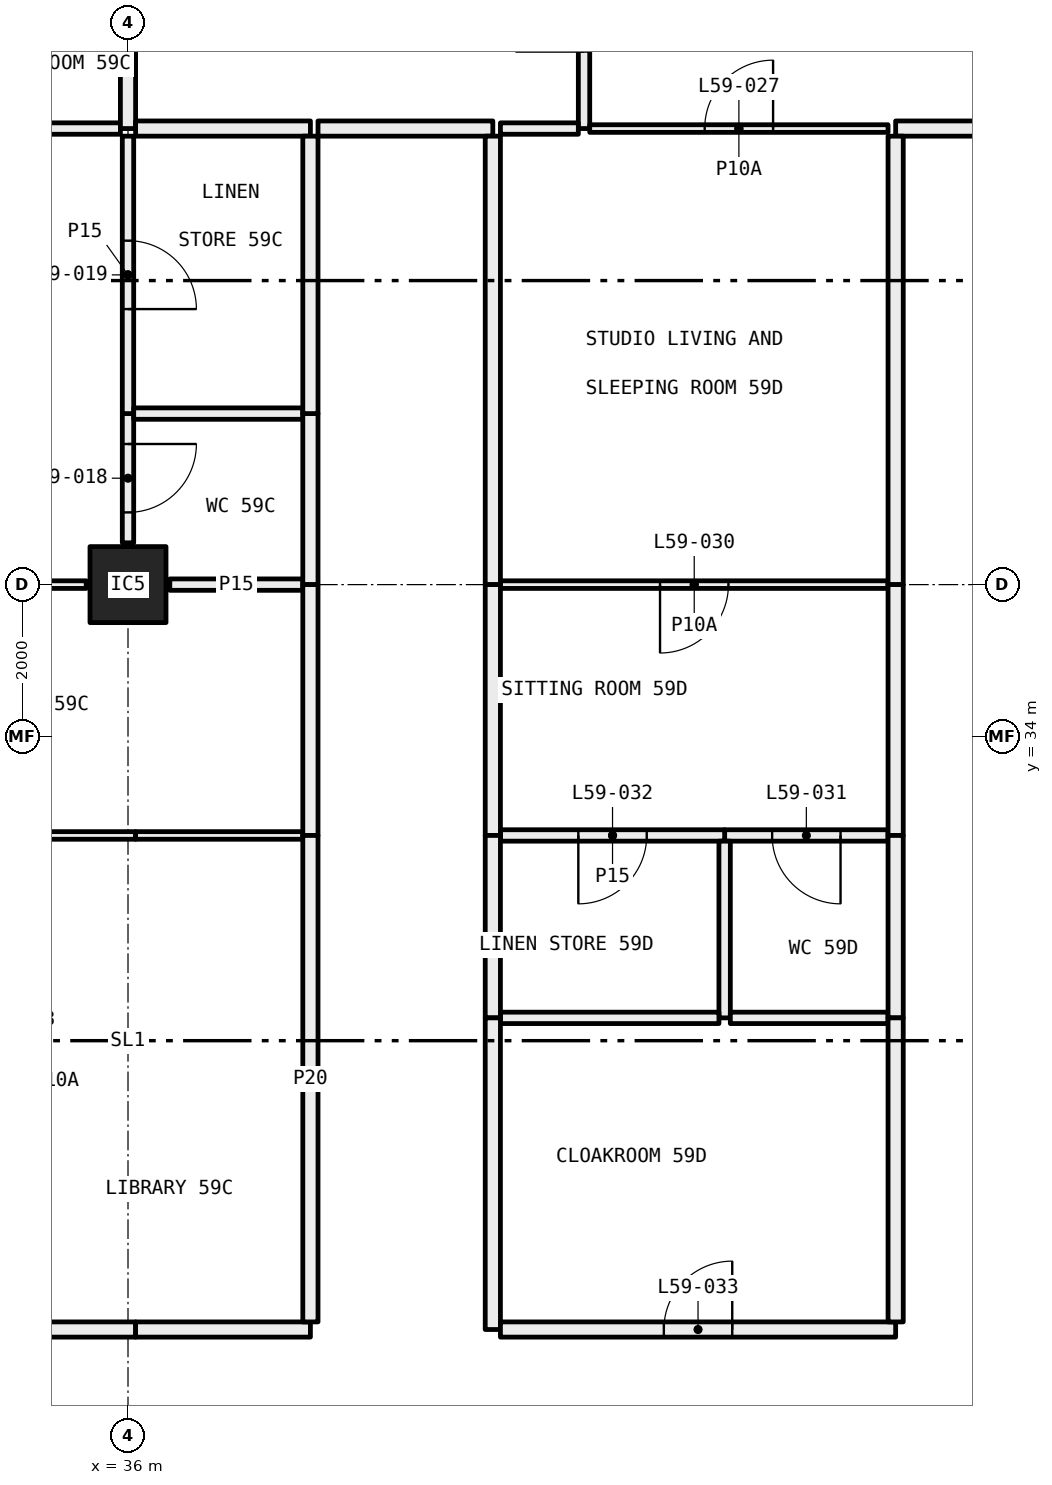
"""IFC4 building model, lengths in metres.
Left out: names, types, materials, properties, quantities, classifications, styles, units other than length and angle.
Written with IfcOpenShell. Run it as: python <this file> out.ifc"""

import sys

from ifc_helpers import new_model, si_unit, direction, frame, frame_2d, origin, origin_2d, place, context, subcontext, project, spatial, rectangle, hollow_rectangle, extrude, element, fill, save


model = new_model("IFC4")
c1 = context("Model", 3, precision=1e-05, world=origin(), true_north=direction((0.0, 1.0)))
c2 = subcontext(c1, "Body", "Model", "MODEL_VIEW")
j1 = project(units=[si_unit("LENGTHUNIT", "METRE"), si_unit("PLANEANGLEUNIT", "RADIAN")], contexts=[c1])
p1 = place(None, origin())
s1 = spatial("IfcSite", under=j1, at=p1, CompositionType="ELEMENT")
p2 = place(p1, origin())
s2 = spatial("IfcBuilding", under=s1, at=p2, CompositionType="ELEMENT")
p3 = place(p2, frame((0.0, 0.0, 221.4)))
s3 = spatial("IfcBuildingStorey", under=s2, at=p3, CompositionType="ELEMENT", Elevation=221.4)
p4 = place(p3, frame((36.0, 36.0, 0.0), z_axis=(0.0, 0.0, 1.0), x_axis=(1.0, 0.0, 0.0)))
e1 = element("IfcColumn", 1, at=p4, inside=s3, PredefinedType="COLUMN", context=c2, shape_type="SweptSolid", body=[
    extrude(hollow_rectangle(XDim=1.0, YDim=1.0, WallThickness=0.04, at=origin_2d()), origin(), (0.0, 0.0, 1.0), 3.05),
])
p5 = place(p3, frame((30.075, 42.0, 0.0), z_axis=(0.0, 0.0, 1.0), x_axis=(1.0, 0.0, 0.0)))
e2 = element("IfcWall", 2, at=p5, inside=s3, PredefinedType="PARTITIONING", context=c2, shape_type="SweptSolid", body=[
    extrude(rectangle(XDim=5.825, YDim=0.15, at=frame_2d((2.913, 0.0))), origin(), (0.0, 0.0, 1.0), 3.05),
])
p6 = place(p5, frame((2.462, 0.0, 0.0)))
e3 = element("IfcOpeningElement", 3, at=p6, cuts=e2, PredefinedType="OPENING", context=c2, shape_type="SweptSolid", body=[
    extrude(rectangle(XDim=0.9, YDim=2.1, at=frame_2d((0.45, 1.05))), frame((0.0, 0.085, 0.0), z_axis=(0.0, -1.0, 0.0), x_axis=(1.0, 0.0, 0.0)), (0.0, 0.0, 1.0), 0.17),
])
p7 = place(p3, frame((36.0, 42.0, 0.0), z_axis=(0.0, 0.0, 1.0), x_axis=(0.0, 1.0, 0.0)))
e4 = element("IfcWall", 4, at=p7, inside=s3, PredefinedType="PARTITIONING", context=c2, shape_type="SweptSolid", body=[
    extrude(rectangle(XDim=1.68, YDim=0.2, at=frame_2d((0.84, 0.0))), origin(), (0.0, 0.0, 1.0), 2.45),
])
p8 = place(p3, frame((36.0, 36.55, 0.0), z_axis=(0.0, 0.0, 1.0), x_axis=(0.0, 1.0, 0.0)))
e5 = element("IfcWall", 5, at=p8, inside=s3, PredefinedType="PARTITIONING", context=c2, shape_type="SweptSolid", body=[
    extrude(rectangle(XDim=1.7, YDim=0.15, at=frame_2d((0.85, 0.0))), origin(), (0.0, 0.0, 1.0), 2.45),
])
p9 = place(p8, frame((0.4, 0.0, 0.0)))
e6 = element("IfcOpeningElement", 6, at=p9, cuts=e5, PredefinedType="OPENING", context=c2, shape_type="SweptSolid", body=[
    extrude(rectangle(XDim=0.9, YDim=2.1, at=frame_2d((0.45, 1.05))), frame((0.0, 0.085, 0.0), z_axis=(0.0, -1.0, 0.0), x_axis=(1.0, 0.0, 0.0)), (0.0, 0.0, 1.0), 0.17),
])
p10 = place(p3, frame((36.0, 38.25, 0.0), z_axis=(0.0, 0.0, 1.0), x_axis=(0.0, 1.0, 0.0)))
e7 = element("IfcWall", 7, at=p10, inside=s3, PredefinedType="PARTITIONING", context=c2, shape_type="SweptSolid", body=[
    extrude(rectangle(XDim=3.65, YDim=0.15, at=frame_2d((1.825, 0.0))), origin(), (0.0, 0.0, 1.0), 2.45),
])
p11 = place(p10, frame((1.375, 0.0, 0.0)))
e8 = element("IfcOpeningElement", 8, at=p11, cuts=e7, PredefinedType="OPENING", context=c2, shape_type="SweptSolid", body=[
    extrude(rectangle(XDim=0.9, YDim=2.1, at=frame_2d((0.45, 1.05))), frame((0.0, 0.085, 0.0), z_axis=(0.0, -1.0, 0.0), x_axis=(1.0, 0.0, 0.0)), (0.0, 0.0, 1.0), 0.17),
])
p12 = place(p3, frame((30.075, 36.0, 0.0), z_axis=(0.0, 0.0, 1.0), x_axis=(1.0, 0.0, 0.0)))
e9 = element("IfcWall", 9, at=p12, inside=s3, PredefinedType="PARTITIONING", context=c2, shape_type="SweptSolid", body=[
    extrude(rectangle(XDim=5.375, YDim=0.1, at=frame_2d((2.688, 0.0))), origin(), (0.0, 0.0, 1.0), 2.45),
])
p13 = place(p12, frame((2.238, 0.0, 0.0)))
e10 = element("IfcOpeningElement", 10, at=p13, cuts=e9, PredefinedType="OPENING", context=c2, shape_type="SweptSolid", body=[
    extrude(rectangle(XDim=0.9, YDim=2.1, at=frame_2d((0.45, 1.05))), frame((0.0, 0.06, 0.0), z_axis=(0.0, -1.0, 0.0), x_axis=(1.0, 0.0, 0.0)), (0.0, 0.0, 1.0), 0.12),
])
p14 = place(p3, frame((38.3, 38.25, 0.0), z_axis=(0.0, 0.0, 1.0), x_axis=(-1.0, 0.0, 0.0)))
e11 = element("IfcWall", 11, at=p14, inside=s3, PredefinedType="PARTITIONING", context=c2, shape_type="SweptSolid", body=[
    extrude(rectangle(XDim=2.225, YDim=0.15, at=frame_2d((1.113, 0.0))), origin(), (0.0, 0.0, 1.0), 2.45),
])
p15 = place(p3, frame((36.55, 36.0, 0.0), z_axis=(0.0, 0.0, 1.0), x_axis=(1.0, 0.0, 0.0)))
e12 = element("IfcWall", 12, at=p15, inside=s3, PredefinedType="PARTITIONING", context=c2, shape_type="SweptSolid", body=[
    extrude(rectangle(XDim=1.75, YDim=0.15, at=frame_2d((0.875, 0.0))), origin(), (0.0, 0.0, 1.0), 2.45),
])
p16 = place(p3, frame((38.4, 36.0, 0.0), z_axis=(0.0, 0.0, 1.0), x_axis=(0.0, 1.0, 0.0)))
e13 = element("IfcWall", 13, at=p16, inside=s3, PredefinedType="PARTITIONING", context=c2, shape_type="SweptSolid", body=[
    extrude(rectangle(XDim=2.25, YDim=0.2, at=frame_2d((1.125, 0.0))), origin(), (0.0, 0.0, 1.0), 2.45),
])
p17 = place(p3, frame((38.4, 42.0, 0.0), z_axis=(0.0, 0.0, 1.0), x_axis=(-1.0, 0.0, 0.0)))
e14 = element("IfcWall", 14, at=p17, inside=s3, PredefinedType="PARTITIONING", context=c2, shape_type="SweptSolid", body=[
    extrude(rectangle(XDim=2.3, YDim=0.2, at=frame_2d((1.15, 0.0))), origin(), (0.0, 0.0, 1.0), 3.05),
])
p18 = place(p3, frame((38.4, 38.25, 0.0), z_axis=(0.0, 0.0, 1.0), x_axis=(0.0, 1.0, 0.0)))
e15 = element("IfcWall", 15, at=p18, inside=s3, PredefinedType="PARTITIONING", context=c2, shape_type="SweptSolid", body=[
    extrude(rectangle(XDim=3.65, YDim=0.2, at=frame_2d((1.825, 0.0))), origin(), (0.0, 0.0, 1.0), 3.05),
])
p19 = place(p3, frame((34.5, 32.7, 0.0), z_axis=(0.0, 0.0, 1.0), x_axis=(1.0, 0.0, 0.0)))
e16 = element("IfcWall", 16, at=p19, inside=s3, PredefinedType="PARTITIONING", context=c2, shape_type="SweptSolid", body=[
    extrude(rectangle(XDim=1.6, YDim=0.1, at=frame_2d((0.8, 0.0))), origin(), (0.0, 0.0, 1.0), 2.45),
])
p20 = place(p3, frame((36.1, 32.7, 0.0), z_axis=(0.0, 0.0, 1.0), x_axis=(1.0, 0.0, 0.0)))
e17 = element("IfcWall", 17, at=p20, inside=s3, PredefinedType="PARTITIONING", context=c2, shape_type="SweptSolid", body=[
    extrude(rectangle(XDim=2.2, YDim=0.1, at=frame_2d((1.1, 0.0))), origin(), (0.0, 0.0, 1.0), 3.05),
])
p21 = place(p3, frame((38.4, 32.7, 0.0), z_axis=(0.0, 0.0, 1.0), x_axis=(0.0, 1.0, 0.0)))
e18 = element("IfcWall", 18, at=p21, inside=s3, PredefinedType="PARTITIONING", context=c2, shape_type="SweptSolid", body=[
    extrude(rectangle(XDim=3.3, YDim=0.2, at=frame_2d((1.65, 0.0))), origin(), (0.0, 0.0, 1.0), 2.45),
])
p22 = place(p3, frame((34.5, 26.2, 0.0), z_axis=(0.0, 0.0, 1.0), x_axis=(1.0, 0.0, 0.0)))
e19 = element("IfcWall", 19, at=p22, inside=s3, PredefinedType="PARTITIONING", context=c2, shape_type="SweptSolid", body=[
    extrude(rectangle(XDim=1.6, YDim=0.2, at=frame_2d((0.8, 0.0))), origin(), (0.0, 0.0, 1.0), 2.45),
])
p23 = place(p3, frame((36.1, 26.2, 0.0), z_axis=(0.0, 0.0, 1.0), x_axis=(1.0, 0.0, 0.0)))
e20 = element("IfcWall", 20, at=p23, inside=s3, PredefinedType="PARTITIONING", context=c2, shape_type="SweptSolid", body=[
    extrude(rectangle(XDim=2.3, YDim=0.2, at=frame_2d((1.15, 0.0))), origin(), (0.0, 0.0, 1.0), 3.05),
])
p24 = place(p3, frame((38.4, 26.3, 0.0), z_axis=(0.0, 0.0, 1.0), x_axis=(0.0, 1.0, 0.0)))
e21 = element("IfcWall", 21, at=p24, inside=s3, PredefinedType="PARTITIONING", context=c2, shape_type="SweptSolid", body=[
    extrude(rectangle(XDim=6.4, YDim=0.2, at=frame_2d((3.2, 0.0))), origin(), (0.0, 0.0, 1.0), 3.05),
])
p25 = place(p3, frame((42.0, 42.0, 0.0), z_axis=(0.0, 0.0, 1.0), x_axis=(0.0, 1.0, 0.0)))
e22 = element("IfcWall", 22, at=p25, inside=s3, PredefinedType="PARTITIONING", context=c2, shape_type="SweptSolid", body=[
    extrude(rectangle(XDim=2.925, YDim=0.15, at=frame_2d((1.462, 0.0))), origin(), (0.0, 0.0, 1.0), 3.05),
])
p26 = place(p25, frame((1.012, 0.0, 0.0)))
e23 = element("IfcOpeningElement", 23, at=p26, cuts=e22, PredefinedType="OPENING", context=c2, shape_type="SweptSolid", body=[
    extrude(rectangle(XDim=0.9, YDim=2.1, at=frame_2d((0.45, 1.05))), frame((0.0, 0.085, 0.0), z_axis=(0.0, -1.0, 0.0), x_axis=(1.0, 0.0, 0.0)), (0.0, 0.0, 1.0), 0.17),
])
p27 = place(p3, frame((40.9, 42.0, 0.0), z_axis=(0.0, 0.0, 1.0), x_axis=(1.0, 0.0, 0.0)))
e24 = element("IfcWall", 24, at=p27, inside=s3, PredefinedType="PARTITIONING", context=c2, shape_type="SweptSolid", body=[
    extrude(rectangle(XDim=1.025, YDim=0.15, at=frame_2d((0.513, 0.0))), origin(), (0.0, 0.0, 1.0), 3.05),
])
p28 = place(p3, frame((38.5, 42.0, 0.0), z_axis=(0.0, 0.0, 1.0), x_axis=(1.0, 0.0, 0.0)))
e25 = element("IfcWall", 25, at=p28, inside=s3, PredefinedType="PARTITIONING", context=c2, shape_type="SweptSolid", body=[
    extrude(rectangle(XDim=2.3, YDim=0.2, at=frame_2d((1.15, 0.0))), origin(), (0.0, 0.0, 1.0), 3.05),
])
p29 = place(p3, frame((42.075, 42.0, 0.0), z_axis=(0.0, 0.0, 1.0), x_axis=(1.0, 0.0, 0.0)))
e26 = element("IfcWall", 26, at=p29, inside=s3, PredefinedType="PARTITIONING", context=c2, shape_type="SweptSolid", body=[
    extrude(rectangle(XDim=3.925, YDim=0.1, at=frame_2d((1.962, 0.0))), origin(), (0.0, 0.0, 1.0), 3.05),
])
p30 = place(p29, frame((1.512, 0.0, 0.0)))
e27 = element("IfcOpeningElement", 27, at=p30, cuts=e26, PredefinedType="OPENING", context=c2, shape_type="SweptSolid", body=[
    extrude(rectangle(XDim=0.9, YDim=2.1, at=frame_2d((0.45, 1.05))), frame((0.0, 0.06, 0.0), z_axis=(0.0, -1.0, 0.0), x_axis=(1.0, 0.0, 0.0)), (0.0, 0.0, 1.0), 0.12),
])
p31 = place(p3, frame((46.1, 42.0, 0.0), z_axis=(0.0, 0.0, 1.0), x_axis=(1.0, 0.0, 0.0)))
e28 = element("IfcWall", 28, at=p31, inside=s3, PredefinedType="PARTITIONING", context=c2, shape_type="SweptSolid", body=[
    extrude(rectangle(XDim=1.9, YDim=0.2, at=frame_2d((0.95, 0.0))), origin(), (0.0, 0.0, 1.0), 3.05),
])
p32 = place(p3, frame((40.9, 36.0, 0.0), z_axis=(0.0, 0.0, 1.0), x_axis=(1.0, 0.0, 0.0)))
e29 = element("IfcWall", 29, at=p32, inside=s3, PredefinedType="PARTITIONING", context=c2, shape_type="SweptSolid", body=[
    extrude(rectangle(XDim=5.1, YDim=0.1, at=frame_2d((2.55, 0.0))), origin(), (0.0, 0.0, 1.0), 2.45),
])
p33 = place(p32, frame((2.1, 0.0, 0.0)))
e30 = element("IfcOpeningElement", 30, at=p33, cuts=e29, PredefinedType="OPENING", context=c2, shape_type="SweptSolid", body=[
    extrude(rectangle(XDim=0.9, YDim=2.1, at=frame_2d((0.45, 1.05))), frame((0.0, 0.06, 0.0), z_axis=(0.0, -1.0, 0.0), x_axis=(1.0, 0.0, 0.0)), (0.0, 0.0, 1.0), 0.12),
])
for number, where, z_axis, x_axis in (
    (31, (40.8, 41.9, 0.0), (0.0, 0.0, 1.0), (0.0, -1.0, 0.0)),
    (32, (46.1, 36.0, 0.0), (0.0, 0.0, 1.0), (0.0, 1.0, 0.0)),
):
    element("IfcWall", number, at=place(p3, frame(where, z_axis=z_axis, x_axis=x_axis)), inside=s3, PredefinedType="PARTITIONING", context=c2, shape_type="SweptSolid", body=[
        extrude(rectangle(XDim=5.9, YDim=0.2, at=frame_2d((2.95, 0.0))), origin(), (0.0, 0.0, 1.0), 2.45),
    ])
p34 = place(p3, frame((43.85, 32.7, 0.0), z_axis=(0.0, 0.0, 1.0), x_axis=(1.0, 0.0, 0.0)))
e33 = element("IfcWall", 33, at=p34, inside=s3, PredefinedType="PARTITIONING", context=c2, shape_type="SweptSolid", body=[
    extrude(rectangle(XDim=2.15, YDim=0.15, at=frame_2d((1.075, 0.0))), origin(), (0.0, 0.0, 1.0), 3.05),
])
p35 = place(p34, frame((0.625, 0.0, 0.0)))
e34 = element("IfcOpeningElement", 34, at=p35, cuts=e33, PredefinedType="OPENING", context=c2, shape_type="SweptSolid", body=[
    extrude(rectangle(XDim=0.9, YDim=2.1, at=frame_2d((0.45, 1.05))), frame((0.0, 0.085, 0.0), z_axis=(0.0, -1.0, 0.0), x_axis=(1.0, 0.0, 0.0)), (0.0, 0.0, 1.0), 0.17),
])
p36 = place(p3, frame((40.9, 32.7, 0.0), z_axis=(0.0, 0.0, 1.0), x_axis=(1.0, 0.0, 0.0)))
e35 = element("IfcWall", 35, at=p36, inside=s3, PredefinedType="PARTITIONING", context=c2, shape_type="SweptSolid", body=[
    extrude(rectangle(XDim=2.95, YDim=0.15, at=frame_2d((1.475, 0.0))), origin(), (0.0, 0.0, 1.0), 3.05),
])
p37 = place(p36, frame((1.025, 0.0, 0.0)))
e36 = element("IfcOpeningElement", 36, at=p37, cuts=e35, PredefinedType="OPENING", context=c2, shape_type="SweptSolid", body=[
    extrude(rectangle(XDim=0.9, YDim=2.1, at=frame_2d((0.45, 1.05))), frame((0.0, 0.085, 0.0), z_axis=(0.0, -1.0, 0.0), x_axis=(1.0, 0.0, 0.0)), (0.0, 0.0, 1.0), 0.17),
])
for number, where, z_axis, x_axis in (
    (37, (40.8, 36.0, 0.0), (0.0, 0.0, 1.0), (0.0, -1.0, 0.0)),
    (38, (46.1, 32.7, 0.0), (0.0, 0.0, 1.0), (0.0, 1.0, 0.0)),
):
    element("IfcWall", number, at=place(p3, frame(where, z_axis=z_axis, x_axis=x_axis)), inside=s3, PredefinedType="PARTITIONING", context=c2, shape_type="SweptSolid", body=[
        extrude(rectangle(XDim=3.3, YDim=0.2, at=frame_2d((1.65, 0.0))), origin(), (0.0, 0.0, 1.0), 2.45),
    ])
p38 = place(p3, frame((43.85, 32.625, 0.0), z_axis=(0.0, 0.0, 1.0), x_axis=(0.0, -1.0, 0.0)))
e39 = element("IfcWall", 39, at=p38, inside=s3, PredefinedType="PARTITIONING", context=c2, shape_type="SweptSolid", body=[
    extrude(rectangle(XDim=2.325, YDim=0.15, at=frame_2d((1.163, 0.0))), origin(), (0.0, 0.0, 1.0), 3.05),
])
p39 = place(p3, frame((43.925, 30.3, 0.0), z_axis=(0.0, 0.0, 1.0), x_axis=(1.0, 0.0, 0.0)))
e40 = element("IfcWall", 40, at=p39, inside=s3, PredefinedType="PARTITIONING", context=c2, shape_type="SweptSolid", body=[
    extrude(rectangle(XDim=2.075, YDim=0.15, at=frame_2d((1.038, 0.0))), origin(), (0.0, 0.0, 1.0), 3.05),
])
p40 = place(p3, frame((46.1, 30.3, 0.0), z_axis=(0.0, 0.0, 1.0), x_axis=(0.0, 1.0, 0.0)))
e41 = element("IfcWall", 41, at=p40, inside=s3, PredefinedType="PARTITIONING", context=c2, shape_type="SweptSolid", body=[
    extrude(rectangle(XDim=2.4, YDim=0.2, at=frame_2d((1.2, 0.0))), origin(), (0.0, 0.0, 1.0), 3.05),
])
p41 = place(p3, frame((40.9, 30.3, 0.0), z_axis=(0.0, 0.0, 1.0), x_axis=(1.0, 0.0, 0.0)))
e42 = element("IfcWall", 42, at=p41, inside=s3, PredefinedType="PARTITIONING", context=c2, shape_type="SweptSolid", body=[
    extrude(rectangle(XDim=2.875, YDim=0.15, at=frame_2d((1.438, 0.0))), origin(), (0.0, 0.0, 1.0), 3.05),
])
p42 = place(p3, frame((40.8, 32.7, 0.0), z_axis=(0.0, 0.0, 1.0), x_axis=(0.0, -1.0, 0.0)))
e43 = element("IfcWall", 43, at=p42, inside=s3, PredefinedType="PARTITIONING", context=c2, shape_type="SweptSolid", body=[
    extrude(rectangle(XDim=2.4, YDim=0.2, at=frame_2d((1.2, 0.0))), origin(), (0.0, 0.0, 1.0), 3.05),
])
p43 = place(p3, frame((40.8, 30.3, 0.0), z_axis=(0.0, 0.0, 1.0), x_axis=(0.0, -1.0, 0.0)))
e44 = element("IfcWall", 44, at=p43, inside=s3, PredefinedType="PARTITIONING", context=c2, shape_type="SweptSolid", body=[
    extrude(rectangle(XDim=4.1, YDim=0.2, at=frame_2d((2.05, 0.0))), origin(), (0.0, 0.0, 1.0), 3.05),
])
p44 = place(p3, frame((40.9, 26.2, 0.0), z_axis=(0.0, 0.0, 1.0), x_axis=(1.0, 0.0, 0.0)))
e45 = element("IfcWall", 45, at=p44, inside=s3, PredefinedType="PARTITIONING", context=c2, shape_type="SweptSolid", body=[
    extrude(rectangle(XDim=5.2, YDim=0.2, at=frame_2d((2.6, 0.0))), origin(), (0.0, 0.0, 1.0), 3.05),
])
p45 = place(p44, frame((2.15, 0.0, 0.0)))
e46 = element("IfcOpeningElement", 46, at=p45, cuts=e45, PredefinedType="OPENING", context=c2, shape_type="SweptSolid", body=[
    extrude(rectangle(XDim=0.9, YDim=2.1, at=frame_2d((0.45, 1.05))), frame((0.0, 0.11, 0.0), z_axis=(0.0, -1.0, 0.0), x_axis=(1.0, 0.0, 0.0)), (0.0, 0.0, 1.0), 0.22),
])
p46 = place(p3, frame((46.1, 26.3, 0.0), z_axis=(0.0, 0.0, 1.0), x_axis=(0.0, 1.0, 0.0)))
e47 = element("IfcWall", 47, at=p46, inside=s3, PredefinedType="PARTITIONING", context=c2, shape_type="SweptSolid", body=[
    extrude(rectangle(XDim=4.0, YDim=0.2, at=frame_2d((2.0, 0.0))), origin(), (0.0, 0.0, 1.0), 3.05),
])
p47 = place(p9, frame((0.9, 0.0, 0.0), x_axis=(-1.0, 0.0, 0.0)))
e48 = element("IfcDoor", 48, at=p47, inside=s3, OperationType="SINGLE_SWING_RIGHT", PredefinedType="DOOR", context=c2, shape_type="SweptSolid", body=[
    extrude(rectangle(XDim=0.9, YDim=2.1, at=frame_2d((0.45, 1.05))), frame((0.0, 0.025, 0.0), z_axis=(0.0, -1.0, 0.0), x_axis=(1.0, 0.0, 0.0)), (0.0, 0.0, 1.0), 0.05),
])
fill(e6, e48)
p48 = place(p11, frame((0.9, 0.0, 0.0), x_axis=(-1.0, 0.0, 0.0)))
e49 = element("IfcDoor", 49, at=p48, inside=s3, OperationType="SINGLE_SWING_LEFT", PredefinedType="DOOR", context=c2, shape_type="SweptSolid", body=[
    extrude(rectangle(XDim=0.9, YDim=2.1, at=frame_2d((0.45, 1.05))), frame((0.0, 0.025, 0.0), z_axis=(0.0, -1.0, 0.0), x_axis=(1.0, 0.0, 0.0)), (0.0, 0.0, 1.0), 0.05),
])
fill(e8, e49)
p49 = place(p30, origin())
e50 = element("IfcDoor", 50, at=p49, inside=s3, OperationType="SINGLE_SWING_LEFT", PredefinedType="DOOR", context=c2, shape_type="SweptSolid", body=[
    extrude(rectangle(XDim=0.9, YDim=2.1, at=frame_2d((0.45, 1.05))), frame((0.0, 0.025, 0.0), z_axis=(0.0, -1.0, 0.0), x_axis=(1.0, 0.0, 0.0)), (0.0, 0.0, 1.0), 0.05),
])
fill(e27, e50)
p50 = place(p33, frame((0.9, 0.0, 0.0), x_axis=(-1.0, 0.0, 0.0)))
e51 = element("IfcDoor", 51, at=p50, inside=s3, OperationType="SINGLE_SWING_LEFT", PredefinedType="DOOR", context=c2, shape_type="SweptSolid", body=[
    extrude(rectangle(XDim=0.9, YDim=2.1, at=frame_2d((0.45, 1.05))), frame((0.0, 0.025, 0.0), z_axis=(0.0, -1.0, 0.0), x_axis=(1.0, 0.0, 0.0)), (0.0, 0.0, 1.0), 0.05),
])
fill(e30, e51)
p51 = place(p35, frame((0.9, 0.0, 0.0), x_axis=(-1.0, 0.0, 0.0)))
e52 = element("IfcDoor", 52, at=p51, inside=s3, OperationType="SINGLE_SWING_RIGHT", PredefinedType="DOOR", context=c2, shape_type="SweptSolid", body=[
    extrude(rectangle(XDim=0.9, YDim=2.1, at=frame_2d((0.45, 1.05))), frame((0.0, 0.025, 0.0), z_axis=(0.0, -1.0, 0.0), x_axis=(1.0, 0.0, 0.0)), (0.0, 0.0, 1.0), 0.05),
])
fill(e34, e52)
p52 = place(p37, frame((0.9, 0.0, 0.0), x_axis=(-1.0, 0.0, 0.0)))
e53 = element("IfcDoor", 53, at=p52, inside=s3, OperationType="SINGLE_SWING_LEFT", PredefinedType="DOOR", context=c2, shape_type="SweptSolid", body=[
    extrude(rectangle(XDim=0.9, YDim=2.1, at=frame_2d((0.45, 1.05))), frame((0.0, 0.025, 0.0), z_axis=(0.0, -1.0, 0.0), x_axis=(1.0, 0.0, 0.0)), (0.0, 0.0, 1.0), 0.05),
])
fill(e36, e53)
p53 = place(p45, origin())
e54 = element("IfcDoor", 54, at=p53, inside=s3, OperationType="SINGLE_SWING_LEFT", PredefinedType="DOOR", context=c2, shape_type="SweptSolid", body=[
    extrude(rectangle(XDim=0.9, YDim=2.1, at=frame_2d((0.45, 1.05))), frame((0.0, 0.025, 0.0), z_axis=(0.0, -1.0, 0.0), x_axis=(1.0, 0.0, 0.0)), (0.0, 0.0, 1.0), 0.05),
])
fill(e46, e54)
save(model, sys.argv[1])
